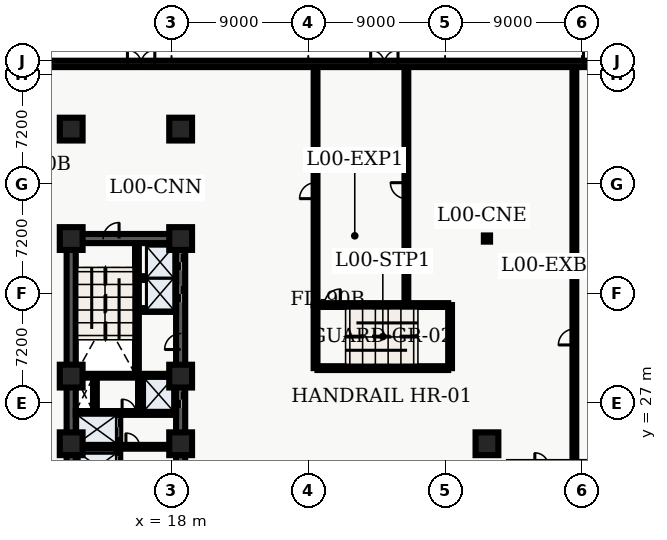
"""IFC4 building model, lengths in metres.
Left out: names, types, materials, properties, quantities, classifications, styles, units other than length and angle.
Written with IfcOpenShell. Run it as: python <this file> out.ifc"""

import sys

from ifc_helpers import new_model, entity, si_unit, converted_unit, direction, frame, origin_with_axes, origin_2d_with_axis, place, context, subcontext, project, spatial, polyline, rectangle, hollow_rectangle, outline, extrude, element, fill, save


model = new_model("IFC4")
c1 = context("Model", 3, precision=1e-05, world=origin_with_axes(), true_north=direction((0.0, 1.0)))
c2 = subcontext(c1, "Body", "Model", "MODEL_VIEW")
j1 = project(units=[si_unit("LENGTHUNIT", "METRE"), converted_unit("PLANEANGLEUNIT", "DEGREE", entity("IfcPlaneAngleMeasure", 0.017), si_unit("PLANEANGLEUNIT", "RADIAN"), dimensions=[0, 0, 0, 0, 0, 0, 0])], contexts=[c1])
p1 = place(None, origin_with_axes())
s1 = spatial("IfcSite", under=j1, at=p1, CompositionType="ELEMENT")
p2 = place(p1, origin_with_axes())
s2 = spatial("IfcBuilding", under=s1, at=p2, CompositionType="ELEMENT")
p3 = place(p2, origin_with_axes())
s3 = spatial("IfcBuildingStorey", under=s2, at=p3, CompositionType="ELEMENT", Elevation=0.0)
p4 = place(p3, frame((11.4, 10.8, 0.0), z_axis=(0.0, 0.0, 1.0), x_axis=(0.0, 1.0, 0.0)))
e1 = element("IfcWall", 1, at=p4, inside=s3, PredefinedType="SHEAR", context=c2, shape_type="SweptSolid", body=[
    extrude(outline(polyline([(0.0, -0.3), (27.0, -0.3), (27.0, 0.3), (0.0, 0.3), (0.0, -0.3)])), origin_with_axes(), (0.0, 0.0, 1.0), 5.46),
])
p5 = place(p3, frame((11.4, 37.8, 0.0), z_axis=(0.0, 0.0, 1.0), x_axis=(1.0, 0.0, 0.0)))
e2 = element("IfcWall", 2, at=p5, inside=s3, PredefinedType="SHEAR", context=c2, shape_type="SweptSolid", body=[
    extrude(outline(polyline([(0.0, -0.3), (7.2, -0.3), (7.2, 0.3), (0.0, 0.3), (0.0, -0.3)])), origin_with_axes(), (0.0, 0.0, 1.0), 5.46),
])
p6 = place(p5, frame((2.625, 0.0, 0.0), z_axis=(0.0, 0.0, 1.0), x_axis=(1.0, 0.0, 0.0)))
e3 = element("IfcOpeningElement", 3, at=p6, cuts=e2, PredefinedType="OPENING", context=c2, shape_type="SweptSolid", body=[
    extrude(rectangle(XDim=1.05, YDim=0.62, at=origin_2d_with_axis()), origin_with_axes(), (0.0, 0.0, 1.0), 2.15),
])
p7 = place(p3, frame((18.6, 10.8, 0.0), z_axis=(0.0, 0.0, 1.0), x_axis=(0.0, 1.0, 0.0)))
e4 = element("IfcWall", 4, at=p7, inside=s3, PredefinedType="SHEAR", context=c2, shape_type="SweptSolid", body=[
    extrude(outline(polyline([(0.0, -0.3), (13.5, -0.3), (13.5, 0.3), (0.0, 0.3), (0.0, -0.3)])), origin_with_axes(), (0.0, 0.0, 1.0), 5.46),
])
p8 = place(p7, frame((1.3, 0.0, 0.0), z_axis=(0.0, 0.0, 1.0), x_axis=(1.0, 0.0, 0.0)))
e5 = element("IfcOpeningElement", 5, at=p8, cuts=e4, PredefinedType="OPENING", context=c2, shape_type="SweptSolid", body=[
    extrude(rectangle(XDim=1.1, YDim=0.62, at=origin_2d_with_axis()), origin_with_axes(), (0.0, 0.0, 1.0), 2.15),
])
p9 = place(p7, frame((3.4, 0.0, 0.0), z_axis=(0.0, 0.0, 1.0), x_axis=(1.0, 0.0, 0.0)))
e6 = element("IfcOpeningElement", 6, at=p9, cuts=e4, PredefinedType="OPENING", context=c2, shape_type="SweptSolid", body=[
    extrude(rectangle(XDim=1.1, YDim=0.62, at=origin_2d_with_axis()), origin_with_axes(), (0.0, 0.0, 1.0), 2.15),
])
p10 = place(p7, frame((5.6, 0.0, 0.0), z_axis=(0.0, 0.0, 1.0), x_axis=(1.0, 0.0, 0.0)))
e7 = element("IfcOpeningElement", 7, at=p10, cuts=e4, PredefinedType="OPENING", context=c2, shape_type="SweptSolid", body=[
    extrude(rectangle(XDim=1.1, YDim=0.62, at=origin_2d_with_axis()), origin_with_axes(), (0.0, 0.0, 1.0), 2.15),
])
p11 = place(p7, frame((7.8, 0.0, 0.0), z_axis=(0.0, 0.0, 1.0), x_axis=(1.0, 0.0, 0.0)))
e8 = element("IfcOpeningElement", 8, at=p11, cuts=e4, PredefinedType="OPENING", context=c2, shape_type="SweptSolid", body=[
    extrude(rectangle(XDim=1.1, YDim=0.62, at=origin_2d_with_axis()), origin_with_axes(), (0.0, 0.0, 1.0), 2.15),
])
p12 = place(p7, frame((11.125, 0.0, 0.0), z_axis=(0.0, 0.0, 1.0), x_axis=(1.0, 0.0, 0.0)))
e9 = element("IfcOpeningElement", 9, at=p12, cuts=e4, PredefinedType="OPENING", context=c2, shape_type="SweptSolid", body=[
    extrude(rectangle(XDim=1.05, YDim=0.62, at=origin_2d_with_axis()), origin_with_axes(), (0.0, 0.0, 1.0), 2.15),
])
p13 = place(p3, frame((18.6, 24.3, 0.0), z_axis=(0.0, 0.0, 1.0), x_axis=(0.0, 1.0, 0.0)))
e10 = element("IfcWall", 10, at=p13, inside=s3, PredefinedType="SHEAR", context=c2, shape_type="SweptSolid", body=[
    extrude(outline(polyline([(0.0, -0.3), (13.5, -0.3), (13.5, 0.3), (0.0, 0.3), (0.0, -0.3)])), origin_with_axes(), (0.0, 0.0, 1.0), 5.46),
])
p14 = place(p13, frame((9.85, 0.0, 0.0), z_axis=(0.0, 0.0, 1.0), x_axis=(1.0, 0.0, 0.0)))
e11 = element("IfcOpeningElement", 11, at=p14, cuts=e10, PredefinedType="OPENING", context=c2, shape_type="SweptSolid", body=[
    extrude(rectangle(XDim=1.1, YDim=0.62, at=origin_2d_with_axis()), origin_with_axes(), (0.0, 0.0, 1.0), 2.15),
])
p15 = place(p13, frame((11.95, 0.0, 0.0), z_axis=(0.0, 0.0, 1.0), x_axis=(1.0, 0.0, 0.0)))
e12 = element("IfcOpeningElement", 12, at=p15, cuts=e10, PredefinedType="OPENING", context=c2, shape_type="SweptSolid", body=[
    extrude(rectangle(XDim=1.1, YDim=0.62, at=origin_2d_with_axis()), origin_with_axes(), (0.0, 0.0, 1.0), 2.15),
])
p16 = place(p13, frame((2.9, 0.0, 0.0), z_axis=(0.0, 0.0, 1.0), x_axis=(1.0, 0.0, 0.0)))
e13 = element("IfcOpeningElement", 13, at=p16, cuts=e10, PredefinedType="OPENING", context=c2, shape_type="SweptSolid", body=[
    extrude(rectangle(XDim=1.1, YDim=0.62, at=origin_2d_with_axis()), origin_with_axes(), (0.0, 0.0, 1.0), 2.15),
])
p17 = place(p13, frame((6.725, 0.0, 0.0), z_axis=(0.0, 0.0, 1.0), x_axis=(1.0, 0.0, 0.0)))
e14 = element("IfcOpeningElement", 14, at=p17, cuts=e10, PredefinedType="OPENING", context=c2, shape_type="SweptSolid", body=[
    extrude(rectangle(XDim=1.05, YDim=0.62, at=origin_2d_with_axis()), origin_with_axes(), (0.0, 0.0, 1.0), 2.15),
])
p18 = place(p3, frame((15.725, 28.9, 0.0), z_axis=(0.0, 0.0, 1.0), x_axis=(0.0, 1.0, 0.0)))
e15 = element("IfcWall", 15, at=p18, inside=s3, PredefinedType="SHEAR", context=c2, shape_type="SweptSolid", body=[
    extrude(outline(polyline([(0.0, -0.125), (8.6, -0.125), (8.6, 0.125), (0.0, 0.125), (0.0, -0.125)])), origin_with_axes(), (0.0, 0.0, 1.0), 5.46),
])
p19 = place(p3, frame((11.7, 28.775, 0.0), z_axis=(0.0, 0.0, 1.0), x_axis=(1.0, 0.0, 0.0)))
e16 = element("IfcWall", 16, at=p19, inside=s3, PredefinedType="SHEAR", context=c2, shape_type="SweptSolid", body=[
    extrude(outline(polyline([(0.0, -0.125), (6.6, -0.125), (6.6, 0.125), (0.0, 0.125), (0.0, -0.125)])), origin_with_axes(), (0.0, 0.0, 1.0), 5.46),
])
p20 = place(p3, frame((14.5, 19.95, 0.0), z_axis=(0.0, 0.0, 1.0), x_axis=(0.0, 1.0, 0.0)))
e17 = element("IfcWall", 17, at=p20, inside=s3, PredefinedType="SOLIDWALL", context=c2, shape_type="SweptSolid", body=[
    extrude(outline(polyline([(0.0, -0.125), (6.25, -0.125), (6.25, 0.125), (0.0, 0.125), (0.0, -0.125)])), origin_with_axes(), (0.0, 0.0, 1.0), 3.6),
])
p21 = place(p20, frame((1.025, 0.0, 0.0), z_axis=(0.0, 0.0, 1.0), x_axis=(1.0, 0.0, 0.0)))
e18 = element("IfcOpeningElement", 18, at=p21, cuts=e17, PredefinedType="OPENING", context=c2, shape_type="SweptSolid", body=[
    extrude(rectangle(XDim=1.1, YDim=0.27, at=origin_2d_with_axis()), origin_with_axes(), (0.0, 0.0, 1.0), 2.15),
])
p22 = place(p20, frame((2.975, 0.0, 0.0), z_axis=(0.0, 0.0, 1.0), x_axis=(1.0, 0.0, 0.0)))
e19 = element("IfcOpeningElement", 19, at=p22, cuts=e17, PredefinedType="OPENING", context=c2, shape_type="SweptSolid", body=[
    extrude(rectangle(XDim=1.1, YDim=0.27, at=origin_2d_with_axis()), origin_with_axes(), (0.0, 0.0, 1.0), 2.15),
])
p23 = place(p20, frame((5.425, 0.0, 0.0), z_axis=(0.0, 0.0, 1.0), x_axis=(1.0, 0.0, 0.0)))
e20 = element("IfcOpeningElement", 20, at=p23, cuts=e17, PredefinedType="OPENING", context=c2, shape_type="SweptSolid", body=[
    extrude(rectangle(XDim=1.2, YDim=0.27, at=origin_2d_with_axis()), origin_with_axes(), (0.0, 0.0, 1.0), 2.15),
])
p24 = place(p3, frame((11.7, 24.1, 0.0), z_axis=(0.0, 0.0, 1.0), x_axis=(1.0, 0.0, 0.0)))
e21 = element("IfcWall", 21, at=p24, inside=s3, PredefinedType="SOLIDWALL", context=c2, shape_type="SweptSolid", body=[
    extrude(outline(polyline([(0.0, -0.125), (6.6, -0.125), (6.6, 0.125), (0.0, 0.125), (0.0, -0.125)])), origin_with_axes(), (0.0, 0.0, 1.0), 3.6),
])
p25 = place(p24, frame((3.75, 0.0, 0.0), z_axis=(0.0, 0.0, 1.0), x_axis=(1.0, 0.0, 0.0)))
e22 = element("IfcOpeningElement", 22, at=p25, cuts=e21, PredefinedType="OPENING", context=c2, shape_type="SweptSolid", body=[
    extrude(rectangle(XDim=0.9, YDim=0.27, at=origin_2d_with_axis()), origin_with_axes(), (0.0, 0.0, 1.0), 2.15),
])
p26 = place(p3, frame((11.7, 26.325, 0.0), z_axis=(0.0, 0.0, 1.0), x_axis=(1.0, 0.0, 0.0)))
e23 = element("IfcWall", 23, at=p26, inside=s3, PredefinedType="SOLIDWALL", context=c2, shape_type="SweptSolid", body=[
    extrude(outline(polyline([(0.0, -0.125), (6.6, -0.125), (6.6, 0.125), (0.0, 0.125), (0.0, -0.125)])), origin_with_axes(), (0.0, 0.0, 1.0), 3.6),
])
p27 = place(p26, frame((3.5, 0.0, 0.0), z_axis=(0.0, 0.0, 1.0), x_axis=(1.0, 0.0, 0.0)))
e24 = element("IfcOpeningElement", 24, at=p27, cuts=e23, PredefinedType="OPENING", context=c2, shape_type="SweptSolid", body=[
    extrude(rectangle(XDim=0.9, YDim=0.27, at=origin_2d_with_axis()), origin_with_axes(), (0.0, 0.0, 1.0), 2.15),
])
for number, where, z_axis, x_axis in (
    (25, (12.96, 26.45, 0.0), (0.0, 0.0, 1.0), (0.0, 1.0, 0.0)),
    (26, (15.925, 26.45, 0.0), (0.0, 0.0, 1.0), (0.0, 1.0, 0.0)),
):
    element("IfcWall", number, at=place(p3, frame(where, z_axis=z_axis, x_axis=x_axis)), inside=s3, PredefinedType="SOLIDWALL", context=c2, shape_type="SweptSolid", body=[
        extrude(outline(polyline([(0.0, -0.125), (2.2, -0.125), (2.2, 0.125), (0.0, 0.125), (0.0, -0.125)])), origin_with_axes(), (0.0, 0.0, 1.0), 3.6),
    ])
for number, where, z_axis, x_axis in (
    (27, (27.475, 29.275, 0.0), (0.0, 0.0, 1.0), (0.0, 1.0, 0.0)),
    (28, (36.325, 29.275, 0.0), (0.0, 0.0, 1.0), (0.0, 1.0, 0.0)),
):
    element("IfcWall", number, at=place(p3, frame(where, z_axis=z_axis, x_axis=x_axis)), inside=s3, PredefinedType="SHEAR", context=c2, shape_type="SweptSolid", body=[
        extrude(outline(polyline([(0.0, -0.125), (4.15, -0.125), (4.15, 0.125), (0.0, 0.125), (0.0, -0.125)])), origin_with_axes(), (0.0, 0.0, 1.0), 5.46),
    ])
p28 = place(p3, frame((27.6, 29.275, 0.0), z_axis=(0.0, 0.0, 1.0), x_axis=(1.0, 0.0, 0.0)))
e29 = element("IfcWall", 29, at=p28, inside=s3, PredefinedType="SHEAR", context=c2, shape_type="SweptSolid", body=[
    extrude(outline(polyline([(0.0, -0.125), (8.6, -0.125), (8.6, 0.125), (0.0, 0.125), (0.0, -0.125)])), origin_with_axes(), (0.0, 0.0, 1.0), 5.46),
])
p29 = place(p3, frame((27.6, 33.425, 0.0), z_axis=(0.0, 0.0, 1.0), x_axis=(1.0, 0.0, 0.0)))
e30 = element("IfcWall", 30, at=p29, inside=s3, PredefinedType="SHEAR", context=c2, shape_type="SweptSolid", body=[
    extrude(outline(polyline([(0.0, -0.125), (8.6, -0.125), (8.6, 0.125), (0.0, 0.125), (0.0, -0.125)])), origin_with_axes(), (0.0, 0.0, 1.0), 5.46),
])
p30 = place(p29, frame((0.975, 0.0, 0.0), z_axis=(0.0, 0.0, 1.0), x_axis=(1.0, 0.0, 0.0)))
e31 = element("IfcOpeningElement", 31, at=p30, cuts=e30, PredefinedType="OPENING", context=c2, shape_type="SweptSolid", body=[
    extrude(rectangle(XDim=1.05, YDim=0.27, at=origin_2d_with_axis()), origin_with_axes(), (0.0, 0.0, 1.0), 2.15),
])
for number, where, z_axis, x_axis in (
    (32, (11.4, 24.3, 0.0), (0.0, 0.0, 1.0), (1.0, 0.0, 0.0)),
    (33, (11.4, 28.75, 0.0), (0.0, 0.0, 1.0), (1.0, 0.0, 0.0)),
    (34, (11.4, 37.8, 0.0), (0.0, 0.0, 1.0), (1.0, 0.0, 0.0)),
    (35, (11.4, 45.0, 0.0), (0.0, 0.0, 1.0), (1.0, 0.0, 0.0)),
    (36, (18.6, 24.3, 0.0), (0.0, 0.0, 1.0), (1.0, 0.0, 0.0)),
    (37, (18.6, 28.75, 0.0), (0.0, 0.0, 1.0), (1.0, 0.0, 0.0)),
    (38, (18.6, 37.8, 0.0), (0.0, 0.0, 1.0), (1.0, 0.0, 0.0)),
    (39, (18.6, 45.0, 0.0), (0.0, 0.0, 1.0), (1.0, 0.0, 0.0)),
    (40, (38.75, 24.3, 0.0), (0.0, 0.0, 1.0), (1.0, 0.0, 0.0)),
):
    element("IfcColumn", number, at=place(p3, frame(where, z_axis=z_axis, x_axis=x_axis)), inside=s3, PredefinedType="COLUMN", context=c2, shape_type="SweptSolid", body=[
        extrude(rectangle(XDim=1.5, YDim=1.5, at=origin_2d_with_axis()), origin_with_axes(), (0.0, 0.0, 1.0), 5.7),
    ])
p31 = place(p3, frame((38.75, 37.8, 0.0), z_axis=(0.0, 0.0, 1.0), x_axis=(1.0, 0.0, 0.0)))
e41 = element("IfcColumn", 41, at=p31, inside=s3, PredefinedType="COLUMN", context=c2, shape_type="SweptSolid", body=[
    extrude(hollow_rectangle(XDim=0.406, YDim=0.406, WallThickness=0.015, InnerFilletRadius=0.015, OuterFilletRadius=0.03, at=origin_2d_with_axis()), origin_with_axes(), (0.0, 0.0, 1.0), 5.7),
])
for number, where, z_axis, x_axis in (
    (42, (15.84, 33.1, 0.0), (0.0, 0.0, 1.0), (1.0, 0.0, 0.0)),
    (43, (15.84, 35.2, 0.0), (0.0, 0.0, 1.0), (1.0, 0.0, 0.0)),
):
    element("IfcWall", number, at=place(p3, frame(where, z_axis=z_axis, x_axis=x_axis)), inside=s3, PredefinedType="SOLIDWALL", context=c2, shape_type="SweptSolid", body=[
        extrude(outline(polyline([(0.0, -0.125), (2.46, -0.125), (2.46, 0.125), (0.0, 0.125), (0.0, -0.125)])), origin_with_axes(), (0.0, 0.0, 1.0), 3.2),
    ])
p32 = place(p3, frame((44.5, 22.8, 0.0), z_axis=(0.0, 0.0, 1.0), x_axis=(0.0, 1.0, 0.0)))
e44 = element("IfcWall", 44, at=p32, inside=s3, PredefinedType="SOLIDWALL", context=c2, shape_type="SweptSolid", body=[
    extrude(outline(polyline([(0.0, -0.125), (26.28, -0.125), (26.28, 0.125), (0.0, 0.125), (0.0, -0.125)])), origin_with_axes(), (0.0, 0.0, 1.0), 3.2),
])
p33 = place(p32, frame((8.525, 0.0, 0.0), z_axis=(0.0, 0.0, 1.0), x_axis=(1.0, 0.0, 0.0)))
e45 = element("IfcOpeningElement", 45, at=p33, cuts=e44, PredefinedType="OPENING", context=c2, shape_type="SweptSolid", body=[
    extrude(rectangle(XDim=1.05, YDim=0.27, at=origin_2d_with_axis()), origin_with_axes(), (0.0, 0.0, 1.0), 2.15),
])
p34 = place(p3, frame((27.475, 33.425, 0.0), z_axis=(0.0, 0.0, 1.0), x_axis=(0.0, 1.0, 0.0)))
e46 = element("IfcWall", 46, at=p34, inside=s3, PredefinedType="SOLIDWALL", context=c2, shape_type="SweptSolid", body=[
    extrude(outline(polyline([(0.0, -0.125), (15.655, -0.125), (15.655, 0.125), (0.0, 0.125), (0.0, -0.125)])), origin_with_axes(), (0.0, 0.0, 1.0), 3.2),
])
p35 = place(p34, frame((7.525, 0.0, 0.0), z_axis=(0.0, 0.0, 1.0), x_axis=(1.0, 0.0, 0.0)))
e47 = element("IfcOpeningElement", 47, at=p35, cuts=e46, PredefinedType="OPENING", context=c2, shape_type="SweptSolid", body=[
    extrude(rectangle(XDim=1.05, YDim=0.27, at=origin_2d_with_axis()), origin_with_axes(), (0.0, 0.0, 1.0), 2.15),
])
p36 = place(p3, frame((33.45, 33.425, 0.0), z_axis=(0.0, 0.0, 1.0), x_axis=(0.0, 1.0, 0.0)))
e48 = element("IfcWall", 48, at=p36, inside=s3, PredefinedType="SOLIDWALL", context=c2, shape_type="SweptSolid", body=[
    extrude(outline(polyline([(0.0, -0.125), (15.655, -0.125), (15.655, 0.125), (0.0, 0.125), (0.0, -0.125)])), origin_with_axes(), (0.0, 0.0, 1.0), 3.2),
])
p37 = place(p36, frame((7.525, 0.0, 0.0), z_axis=(0.0, 0.0, 1.0), x_axis=(1.0, 0.0, 0.0)))
e49 = element("IfcOpeningElement", 49, at=p37, cuts=e48, PredefinedType="OPENING", context=c2, shape_type="SweptSolid", body=[
    extrude(rectangle(XDim=1.05, YDim=0.27, at=origin_2d_with_axis()), origin_with_axes(), (0.0, 0.0, 1.0), 2.15),
])
p38 = place(p3, frame((0.42, 49.29, 0.0), z_axis=(0.0, 0.0, 1.0), x_axis=(1.0, 0.0, 0.0)))
e50 = element("IfcWall", 50, at=p38, inside=s3, PredefinedType="SOLIDWALL", context=c2, shape_type="SweptSolid", body=[
    extrude(outline(polyline([(0.0, -0.21), (53.58, -0.21), (53.58, 0.21), (0.0, 0.21), (0.0, -0.21)])), origin_with_axes(), (0.0, 0.0, 1.0), 5.46),
])
p39 = place(p38, frame((15.58, 0.0, 0.0), z_axis=(0.0, 0.0, 1.0), x_axis=(1.0, 0.0, 0.0)))
e51 = element("IfcOpeningElement", 51, at=p39, cuts=e50, PredefinedType="OPENING", context=c2, shape_type="SweptSolid", body=[
    extrude(rectangle(XDim=1.8, YDim=0.44, at=origin_2d_with_axis()), origin_with_axes(), (0.0, 0.0, 1.0), 2.2),
])
p40 = place(p38, frame((31.58, 0.0, 0.0), z_axis=(0.0, 0.0, 1.0), x_axis=(1.0, 0.0, 0.0)))
e52 = element("IfcOpeningElement", 52, at=p40, cuts=e50, PredefinedType="OPENING", context=c2, shape_type="SweptSolid", body=[
    extrude(rectangle(XDim=1.8, YDim=0.44, at=origin_2d_with_axis()), origin_with_axes(), (0.0, 0.0, 1.0), 2.2),
])
p41 = place(p38, frame((45.58, 0.0, 0.0), z_axis=(0.0, 0.0, 1.0), x_axis=(1.0, 0.0, 0.0)))
e53 = element("IfcOpeningElement", 53, at=p41, cuts=e50, PredefinedType="OPENING", context=c2, shape_type="SweptSolid", body=[
    extrude(rectangle(XDim=1.8, YDim=0.44, at=origin_2d_with_axis()), origin_with_axes(), (0.0, 0.0, 1.0), 2.2),
])
p42 = place(p38, frame((2.23, 0.0, 0.0), z_axis=(0.0, 0.0, 1.0), x_axis=(1.0, 0.0, 0.0)))
e54 = element("IfcOpeningElement", 54, at=p42, cuts=e50, PredefinedType="OPENING", context=c2, shape_type="SweptSolid", body=[
    extrude(rectangle(XDim=3.6, YDim=0.44, at=origin_2d_with_axis()), origin_with_axes(), (0.0, 0.0, 1.0), 4.2),
])
p43 = place(p38, frame((6.43, 0.0, 0.0), z_axis=(0.0, 0.0, 1.0), x_axis=(1.0, 0.0, 0.0)))
e55 = element("IfcOpeningElement", 55, at=p43, cuts=e50, PredefinedType="OPENING", context=c2, shape_type="SweptSolid", body=[
    extrude(rectangle(XDim=3.6, YDim=0.44, at=origin_2d_with_axis()), origin_with_axes(), (0.0, 0.0, 1.0), 4.2),
])
p44 = place(p13, frame((9.85, 0.0, 0.0), z_axis=(0.0, 0.0, 1.0), x_axis=(1.0, 0.0, 0.0)))
e56 = element("IfcDoor", 56, at=p44, inside=s3, OperationType="DOUBLE_DOOR_SLIDING", PredefinedType="DOOR", context=c2, shape_type="SweptSolid", body=[
    extrude(rectangle(XDim=1.1, YDim=0.09, at=origin_2d_with_axis()), origin_with_axes(), (0.0, 0.0, 1.0), 2.15),
])
fill(e11, e56)
p45 = place(p13, frame((11.95, 0.0, 0.0), z_axis=(0.0, 0.0, 1.0), x_axis=(1.0, 0.0, 0.0)))
e57 = element("IfcDoor", 57, at=p45, inside=s3, OperationType="DOUBLE_DOOR_SLIDING", PredefinedType="DOOR", context=c2, shape_type="SweptSolid", body=[
    extrude(rectangle(XDim=1.1, YDim=0.09, at=origin_2d_with_axis()), origin_with_axes(), (0.0, 0.0, 1.0), 2.15),
])
fill(e12, e57)
p46 = place(p13, frame((2.9, 0.0, 0.0), z_axis=(0.0, 0.0, 1.0), x_axis=(1.0, 0.0, 0.0)))
e58 = element("IfcDoor", 58, at=p46, inside=s3, OperationType="DOUBLE_DOOR_SLIDING", PredefinedType="DOOR", context=c2, shape_type="SweptSolid", body=[
    extrude(rectangle(XDim=1.1, YDim=0.09, at=origin_2d_with_axis()), origin_with_axes(), (0.0, 0.0, 1.0), 2.15),
])
fill(e13, e58)
p47 = place(p20, frame((2.975, 0.0, 0.0), z_axis=(0.0, 0.0, 1.0), x_axis=(1.0, 0.0, 0.0)))
e59 = element("IfcDoor", 59, at=p47, inside=s3, OperationType="SLIDING_TO_RIGHT", PredefinedType="DOOR", context=c2, shape_type="SweptSolid", body=[
    extrude(rectangle(XDim=1.1, YDim=0.09, at=origin_2d_with_axis()), origin_with_axes(), (0.0, 0.0, 1.0), 2.15),
])
fill(e19, e59)
p48 = place(p20, frame((5.425, 0.0, 0.0), z_axis=(0.0, 0.0, 1.0), x_axis=(1.0, 0.0, 0.0)))
e60 = element("IfcDoor", 60, at=p48, inside=s3, OperationType="DOUBLE_DOOR_SLIDING", PredefinedType="DOOR", context=c2, shape_type="SweptSolid", body=[
    extrude(rectangle(XDim=1.2, YDim=0.09, at=origin_2d_with_axis()), origin_with_axes(), (0.0, 0.0, 1.0), 2.15),
])
fill(e20, e60)
p49 = place(p5, frame((2.625, 0.0, 0.0), z_axis=(0.0, 0.0, 1.0), x_axis=(1.0, 0.0, 0.0)))
e61 = element("IfcDoor", 61, at=p49, inside=s3, OperationType="SINGLE_SWING_RIGHT", PredefinedType="DOOR", context=c2, shape_type="SweptSolid", body=[
    extrude(rectangle(XDim=1.05, YDim=0.09, at=origin_2d_with_axis()), origin_with_axes(), (0.0, 0.0, 1.0), 2.15),
])
fill(e3, e61)
p50 = place(p24, frame((3.75, 0.0, 0.0), z_axis=(0.0, 0.0, 1.0), x_axis=(1.0, 0.0, 0.0)))
e62 = element("IfcDoor", 62, at=p50, inside=s3, OperationType="SINGLE_SWING_LEFT", PredefinedType="DOOR", context=c2, shape_type="SweptSolid", body=[
    extrude(rectangle(XDim=0.9, YDim=0.09, at=origin_2d_with_axis()), origin_with_axes(), (0.0, 0.0, 1.0), 2.15),
])
fill(e22, e62)
p51 = place(p26, frame((3.5, 0.0, 0.0), z_axis=(0.0, 0.0, 1.0), x_axis=(1.0, 0.0, 0.0)))
e63 = element("IfcDoor", 63, at=p51, inside=s3, OperationType="SINGLE_SWING_LEFT", PredefinedType="DOOR", context=c2, shape_type="SweptSolid", body=[
    extrude(rectangle(XDim=0.9, YDim=0.09, at=origin_2d_with_axis()), origin_with_axes(), (0.0, 0.0, 1.0), 2.15),
])
fill(e24, e63)
p52 = place(p13, frame((6.725, 0.0, 0.0), z_axis=(0.0, 0.0, 1.0), x_axis=(1.0, 0.0, 0.0)))
e64 = element("IfcDoor", 64, at=p52, inside=s3, OperationType="SINGLE_SWING_LEFT", PredefinedType="DOOR", context=c2, shape_type="SweptSolid", body=[
    extrude(rectangle(XDim=1.05, YDim=0.09, at=origin_2d_with_axis()), origin_with_axes(), (0.0, 0.0, 1.0), 2.15),
])
fill(e14, e64)
p53 = place(p29, frame((0.975, 0.0, 0.0), z_axis=(0.0, 0.0, 1.0), x_axis=(1.0, 0.0, 0.0)))
e65 = element("IfcDoor", 65, at=p53, inside=s3, OperationType="SINGLE_SWING_RIGHT", PredefinedType="DOOR", context=c2, shape_type="SweptSolid", body=[
    extrude(rectangle(XDim=1.05, YDim=0.09, at=origin_2d_with_axis()), origin_with_axes(), (0.0, 0.0, 1.0), 2.15),
])
fill(e31, e65)
p54 = place(p32, frame((8.525, 0.0, 0.0), z_axis=(0.0, 0.0, 1.0), x_axis=(1.0, 0.0, 0.0)))
e66 = element("IfcDoor", 66, at=p54, inside=s3, OperationType="SINGLE_SWING_LEFT", PredefinedType="DOOR", context=c2, shape_type="SweptSolid", body=[
    extrude(rectangle(XDim=1.05, YDim=0.09, at=origin_2d_with_axis()), origin_with_axes(), (0.0, 0.0, 1.0), 2.15),
])
fill(e45, e66)
p55 = place(p34, frame((7.525, 0.0, 0.0), z_axis=(0.0, 0.0, 1.0), x_axis=(1.0, 0.0, 0.0)))
e67 = element("IfcDoor", 67, at=p55, inside=s3, OperationType="SINGLE_SWING_LEFT", PredefinedType="DOOR", context=c2, shape_type="SweptSolid", body=[
    extrude(rectangle(XDim=1.05, YDim=0.09, at=origin_2d_with_axis()), origin_with_axes(), (0.0, 0.0, 1.0), 2.15),
])
fill(e47, e67)
p56 = place(p36, frame((7.525, 0.0, 0.0), z_axis=(0.0, 0.0, 1.0), x_axis=(1.0, 0.0, 0.0)))
e68 = element("IfcDoor", 68, at=p56, inside=s3, OperationType="SINGLE_SWING_RIGHT", PredefinedType="DOOR", context=c2, shape_type="SweptSolid", body=[
    extrude(rectangle(XDim=1.05, YDim=0.09, at=origin_2d_with_axis()), origin_with_axes(), (0.0, 0.0, 1.0), 2.15),
])
fill(e49, e68)
p57 = place(p38, frame((15.58, 0.0, 0.0), z_axis=(0.0, 0.0, 1.0), x_axis=(1.0, 0.0, 0.0)))
e69 = element("IfcDoor", 69, at=p57, inside=s3, OperationType="DOUBLE_DOOR_SINGLE_SWING", PredefinedType="DOOR", context=c2, shape_type="SweptSolid", body=[
    extrude(rectangle(XDim=1.8, YDim=0.09, at=origin_2d_with_axis()), origin_with_axes(), (0.0, 0.0, 1.0), 2.2),
])
fill(e51, e69)
p58 = place(p38, frame((31.58, 0.0, 0.0), z_axis=(0.0, 0.0, 1.0), x_axis=(1.0, 0.0, 0.0)))
e70 = element("IfcDoor", 70, at=p58, inside=s3, OperationType="DOUBLE_DOOR_SINGLE_SWING", PredefinedType="DOOR", context=c2, shape_type="SweptSolid", body=[
    extrude(rectangle(XDim=1.8, YDim=0.09, at=origin_2d_with_axis()), origin_with_axes(), (0.0, 0.0, 1.0), 2.2),
])
fill(e52, e70)
p59 = place(p38, frame((45.58, 0.0, 0.0), z_axis=(0.0, 0.0, 1.0), x_axis=(1.0, 0.0, 0.0)))
e71 = element("IfcDoor", 71, at=p59, inside=s3, OperationType="DOUBLE_DOOR_SINGLE_SWING", PredefinedType="DOOR", context=c2, shape_type="SweptSolid", body=[
    extrude(rectangle(XDim=1.8, YDim=0.09, at=origin_2d_with_axis()), origin_with_axes(), (0.0, 0.0, 1.0), 2.2),
])
fill(e53, e71)
save(model, sys.argv[1])
